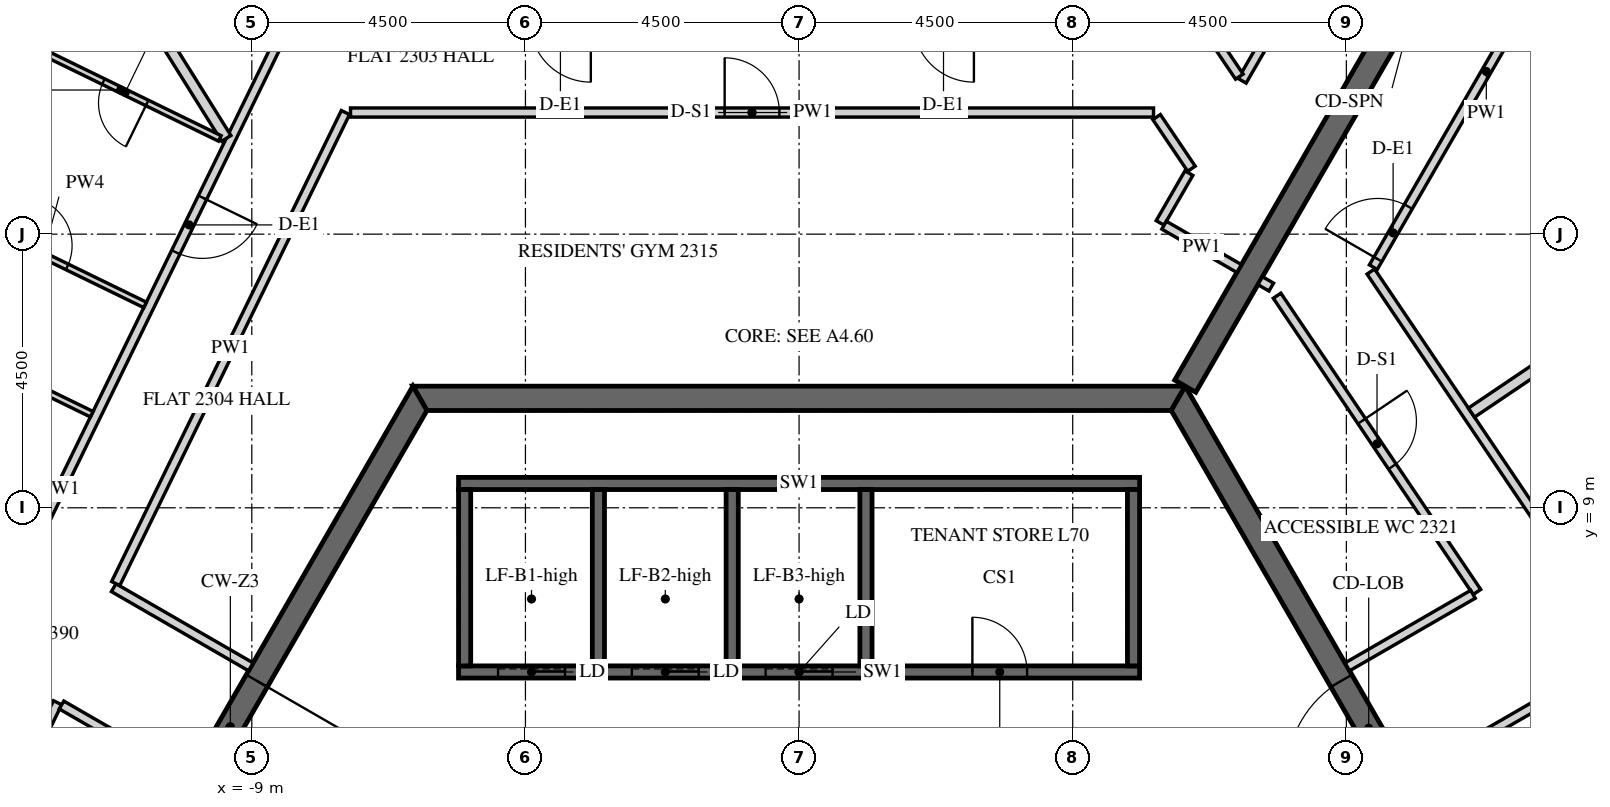
"""IFC4 building model, lengths in metres.
Left out: names, types, materials, properties, quantities, classifications, styles, units other than length and angle.
Written with IfcOpenShell. Run it as: python <this file> out.ifc"""

import sys

from ifc_helpers import new_model, si_unit, direction, frame, frame_2d, origin, place, context, subcontext, project, spatial, polyline, rectangle, outline, extrude, element, fill, save


model = new_model("IFC4")
c1 = context("Model", 3, precision=1e-05, world=origin(), true_north=direction((0.0, 1.0)))
c2 = subcontext(c1, "Body", "Model", "MODEL_VIEW")
j1 = project(units=[si_unit("LENGTHUNIT", "METRE"), si_unit("PLANEANGLEUNIT", "RADIAN")], contexts=[c1])
p1 = place(None, origin())
s1 = spatial("IfcSite", under=j1, at=p1, CompositionType="ELEMENT")
p2 = place(p1, origin())
s2 = spatial("IfcBuilding", under=s1, at=p2, CompositionType="ELEMENT")
p3 = place(p2, frame((0.0, 0.0, 291.3)))
s3 = spatial("IfcBuildingStorey", under=s2, at=p3, CompositionType="ELEMENT", Elevation=291.3)
p4 = place(p3, frame((-6.235, 10.8, -0.15), z_axis=(0.0, 0.0, 1.0), x_axis=(-0.499996419489, -0.866027470984, 0.0)))
e1 = element("IfcWall", 1, at=p4, inside=s3, PredefinedType="SHEAR", context=c2, shape_type="SweptSolid", body=[
    extrude(outline(polyline([(-0.115, -0.2), (12.586, -0.2), (12.355, 0.2), (0.115, 0.2), (-0.115, -0.2)])), origin(), (0.0, 0.0, 1.0), 3.9),
])
p5 = place(p4, frame((5.364, 0.0, 0.15)))
e2 = element("IfcOpeningElement", 2, at=p5, cuts=e1, PredefinedType="OPENING", context=c2, shape_type="SweptSolid", body=[
    extrude(rectangle(XDim=1.8, YDim=2.4, at=frame_2d((0.9, 1.2))), frame((0.0, 0.21, 0.0), z_axis=(0.0, -1.0, 0.0), x_axis=(1.0, 0.0, 0.0)), (0.0, 0.0, 1.0), 0.42),
])
p6 = place(p3, frame((12.471, 0.0, -0.15), z_axis=(0.0, 0.0, 1.0), x_axis=(-0.499996419489, 0.866027470984, 0.0)))
e3 = element("IfcWall", 3, at=p6, inside=s3, PredefinedType="SHEAR", context=c2, shape_type="SweptSolid", body=[
    extrude(outline(polyline([(-0.115, -0.2), (12.586, -0.2), (12.355, 0.2), (0.115, 0.2), (-0.115, -0.2)])), origin(), (0.0, 0.0, 1.0), 3.9),
])
p7 = place(p6, frame((5.306, 0.0, 0.15)))
e4 = element("IfcOpeningElement", 4, at=p7, cuts=e3, PredefinedType="OPENING", context=c2, shape_type="SweptSolid", body=[
    extrude(rectangle(XDim=1.8, YDim=2.4, at=frame_2d((0.9, 1.2))), frame((0.0, 0.21, 0.0), z_axis=(0.0, -1.0, 0.0), x_axis=(1.0, 0.0, 0.0)), (0.0, 0.0, 1.0), 0.42),
])
p8 = place(p3, frame((6.235, 10.8, -0.15), z_axis=(0.0, 0.0, 1.0), x_axis=(-1.0, 0.0, 0.0)))
e5 = element("IfcWall", 5, at=p8, inside=s3, PredefinedType="SHEAR", context=c2, shape_type="SweptSolid", body=[
    extrude(outline(polyline([(-0.115, -0.2), (12.586, -0.2), (12.355, 0.2), (0.115, 0.2), (-0.115, -0.2)])), origin(), (0.0, 0.0, 1.0), 3.9),
])
p9 = place(p3, frame((6.351, 11.0, -0.15), z_axis=(0.0, 0.0, 1.0), x_axis=(0.499998894578, 0.866026041999, 0.0)))
e6 = element("IfcWall", 6, at=p9, inside=s3, PredefinedType="SHEAR", context=c2, shape_type="SweptSolid", body=[
    extrude(rectangle(XDim=15.544, YDim=0.4, at=frame_2d((7.772, 0.0))), origin(), (0.0, 0.0, 1.0), 3.9),
])
p10 = place(p9, frame((6.872, 0.0, 0.15)))
e7 = element("IfcOpeningElement", 7, at=p10, cuts=e6, PredefinedType="OPENING", context=c2, shape_type="SweptSolid", body=[
    extrude(rectangle(XDim=1.8, YDim=2.4, at=frame_2d((0.9, 1.2))), frame((0.0, 0.21, 0.0), z_axis=(0.0, -1.0, 0.0), x_axis=(1.0, 0.0, 0.0)), (0.0, 0.0, 1.0), 0.42),
])
p11 = place(p3, frame((-5.6, 6.3, -0.25), z_axis=(0.0, 0.0, 1.0), x_axis=(1.0, 0.0, 0.0)))
e8 = element("IfcWall", 8, at=p11, inside=s3, PredefinedType="SHEAR", context=c2, shape_type="SweptSolid", body=[
    extrude(rectangle(XDim=11.2, YDim=0.2, at=frame_2d((5.6, 0.0))), origin(), (0.0, 0.0, 1.0), 3.9),
])
p12 = place(p11, frame((8.45, 0.0, 0.25)))
e9 = element("IfcOpeningElement", 9, at=p12, cuts=e8, PredefinedType="OPENING", context=c2, shape_type="SweptSolid", body=[
    extrude(rectangle(XDim=0.9, YDim=2.1, at=frame_2d((0.45, 1.05))), frame((0.0, 0.11, 0.0), z_axis=(0.0, -1.0, 0.0), x_axis=(1.0, 0.0, 0.0)), (0.0, 0.0, 1.0), 0.22),
])
p13 = place(p11, frame((0.65, 0.0, 0.25)))
e10 = element("IfcOpeningElement", 10, at=p13, cuts=e8, PredefinedType="OPENING", context=c2, shape_type="SweptSolid", body=[
    extrude(rectangle(XDim=1.1, YDim=2.1, at=frame_2d((0.55, 1.05))), frame((0.0, 0.11, 0.0), z_axis=(0.0, -1.0, 0.0), x_axis=(1.0, 0.0, 0.0)), (0.0, 0.0, 1.0), 0.22),
])
p14 = place(p11, frame((2.85, 0.0, 0.25)))
e11 = element("IfcOpeningElement", 11, at=p14, cuts=e8, PredefinedType="OPENING", context=c2, shape_type="SweptSolid", body=[
    extrude(rectangle(XDim=1.1, YDim=2.1, at=frame_2d((0.55, 1.05))), frame((0.0, 0.11, 0.0), z_axis=(0.0, -1.0, 0.0), x_axis=(1.0, 0.0, 0.0)), (0.0, 0.0, 1.0), 0.22),
])
p15 = place(p11, frame((5.05, 0.0, 0.25)))
e12 = element("IfcOpeningElement", 12, at=p15, cuts=e8, PredefinedType="OPENING", context=c2, shape_type="SweptSolid", body=[
    extrude(rectangle(XDim=1.1, YDim=2.1, at=frame_2d((0.55, 1.05))), frame((0.0, 0.11, 0.0), z_axis=(0.0, -1.0, 0.0), x_axis=(1.0, 0.0, 0.0)), (0.0, 0.0, 1.0), 0.22),
])
p16 = place(p3, frame((-5.6, 9.4, -0.25), z_axis=(0.0, 0.0, 1.0), x_axis=(1.0, 0.0, 0.0)))
e13 = element("IfcWall", 13, at=p16, inside=s3, PredefinedType="SHEAR", context=c2, shape_type="SweptSolid", body=[
    extrude(rectangle(XDim=11.2, YDim=0.2, at=frame_2d((5.6, 0.0))), origin(), (0.0, 0.0, 1.0), 3.9),
])
for number, where, z_axis, x_axis in (
    (14, (-5.5, 6.4, -0.25), (0.0, 0.0, 1.0), (0.0, 1.0, 0.0)),
    (15, (-3.3, 6.4, -0.25), (0.0, 0.0, 1.0), (0.0, 1.0, 0.0)),
    (16, (-1.1, 6.4, -0.25), (0.0, 0.0, 1.0), (0.0, 1.0, 0.0)),
    (17, (1.1, 6.4, -0.25), (0.0, 0.0, 1.0), (0.0, 1.0, 0.0)),
    (18, (5.5, 6.4, -0.25), (0.0, 0.0, 1.0), (0.0, 1.0, 0.0)),
):
    element("IfcWall", number, at=place(p3, frame(where, z_axis=z_axis, x_axis=x_axis)), inside=s3, PredefinedType="SHEAR", context=c2, shape_type="SweptSolid", body=[
        extrude(rectangle(XDim=2.9, YDim=0.2, at=frame_2d((1.45, 0.0))), origin(), (0.0, 0.0, 1.0), 3.9),
    ])
p17 = place(p3, frame((10.177, 21.027, 0.0), z_axis=(0.0, 0.0, 1.0), x_axis=(-0.500013707032, -0.866017489881, 0.0)))
e19 = element("IfcWall", 19, at=p17, inside=s3, PredefinedType="PARTITIONING", context=c2, shape_type="SweptSolid", body=[
    extrude(rectangle(XDim=5.781, YDim=0.15, at=frame_2d((2.89, 0.0))), origin(), (0.0, 0.0, 1.0), 2.988),
])
p18 = place(p17, frame((2.353, 0.0, 0.0)))
e20 = element("IfcOpeningElement", 20, at=p18, cuts=e19, PredefinedType="OPENING", context=c2, shape_type="SweptSolid", body=[
    extrude(rectangle(XDim=1.0, YDim=2.1, at=frame_2d((0.5, 1.05))), frame((0.0, 0.085, 0.0), z_axis=(0.0, -1.0, 0.0), x_axis=(1.0, 0.0, 0.0)), (0.0, 0.0, 1.0), 0.17),
])
p19 = place(p3, frame((7.24, 16.09, 0.0), z_axis=(0.0, 0.0, 1.0), x_axis=(-0.559159452146, 0.829060134777, 0.0)))
e21 = element("IfcWall", 21, at=p19, inside=s3, PredefinedType="PARTITIONING", context=c2, shape_type="SweptSolid", body=[
    extrude(rectangle(XDim=1.097, YDim=0.15, at=frame_2d((0.549, 0.0))), origin(), (0.0, 0.0, 1.0), 2.988),
])
p20 = place(p3, frame((-8.434, 16.925, 0.0), z_axis=(0.0, 0.0, 1.0), x_axis=(-0.438371383278, -0.898793930956, 0.0)))
e22 = element("IfcWall", 22, at=p20, inside=s3, PredefinedType="PARTITIONING", context=c2, shape_type="SweptSolid", body=[
    extrude(rectangle(XDim=16.939, YDim=0.15, at=frame_2d((8.47, 0.0))), origin(), (0.0, 0.0, 1.0), 2.988),
])
p21 = place(p20, frame((3.142, 0.0, 0.0)))
e23 = element("IfcOpeningElement", 23, at=p21, cuts=e22, PredefinedType="OPENING", context=c2, shape_type="SweptSolid", body=[
    extrude(rectangle(XDim=1.0, YDim=2.1, at=frame_2d((0.5, 1.05))), frame((0.0, 0.085, 0.0), z_axis=(0.0, -1.0, 0.0), x_axis=(1.0, 0.0, 0.0)), (0.0, 0.0, 1.0), 0.17),
])
p22 = place(p20, frame((15.39, 0.0, 0.0)))
e24 = element("IfcOpeningElement", 24, at=p22, cuts=e22, PredefinedType="OPENING", context=c2, shape_type="SweptSolid", body=[
    extrude(rectangle(XDim=1.0, YDim=2.1, at=frame_2d((0.5, 1.05))), frame((0.0, 0.085, 0.0), z_axis=(0.0, -1.0, 0.0), x_axis=(1.0, 0.0, 0.0)), (0.0, 0.0, 1.0), 0.17),
])
p23 = place(p3, frame((-9.016, 6.384, 0.0), z_axis=(0.0, 0.0, 1.0), x_axis=(-0.866031051173, 0.499990218309, 0.0)))
e25 = element("IfcWall", 25, at=p23, inside=s3, PredefinedType="PARTITIONING", context=c2, shape_type="SweptSolid", body=[
    extrude(rectangle(XDim=2.604, YDim=0.15, at=frame_2d((1.302, 0.0))), origin(), (0.0, 0.0, 1.0), 2.988),
])
p24 = place(p3, frame((-11.238, 7.754, 0.0), z_axis=(0.0, 0.0, 1.0), x_axis=(0.438387352899, 0.89878614187, 0.0)))
e26 = element("IfcWall", 26, at=p24, inside=s3, PredefinedType="PARTITIONING", context=c2, shape_type="SweptSolid", body=[
    extrude(rectangle(XDim=8.618, YDim=0.15, at=frame_2d((4.309, 0.0))), origin(), (0.0, 0.0, 1.0), 2.988),
])
p25 = place(p3, frame((-7.377, 15.5, 0.0), z_axis=(0.0, 0.0, 1.0), x_axis=(1.0, 0.0, 0.0)))
e27 = element("IfcWall", 27, at=p25, inside=s3, PredefinedType="PARTITIONING", context=c2, shape_type="SweptSolid", body=[
    extrude(rectangle(XDim=13.206, YDim=0.15, at=frame_2d((6.603, 0.0))), origin(), (0.0, 0.0, 1.0), 2.988),
])
p26 = place(p25, frame((6.153, 0.0, 0.0)))
e28 = element("IfcOpeningElement", 28, at=p26, cuts=e27, PredefinedType="OPENING", context=c2, shape_type="SweptSolid", body=[
    extrude(rectangle(XDim=0.9, YDim=2.1, at=frame_2d((0.45, 1.05))), frame((0.0, 0.085, 0.0), z_axis=(0.0, -1.0, 0.0), x_axis=(1.0, 0.0, 0.0)), (0.0, 0.0, 1.0), 0.17),
])
p27 = place(p3, frame((5.88, 15.425, 0.0), z_axis=(0.0, 0.0, 1.0), x_axis=(0.559202631314, -0.829031010959, 0.0)))
e29 = element("IfcWall", 29, at=p27, inside=s3, PredefinedType="PARTITIONING", context=c2, shape_type="SweptSolid", body=[
    extrude(rectangle(XDim=1.024, YDim=0.15, at=frame_2d((0.512, 0.0))), origin(), (0.0, 0.0, 1.0), 2.988),
])
p28 = place(p3, frame((6.411, 14.504, 0.0), z_axis=(0.0, 0.0, 1.0), x_axis=(-0.499998034377, -0.866026538634, 0.0)))
e30 = element("IfcWall", 30, at=p28, inside=s3, PredefinedType="PARTITIONING", context=c2, shape_type="SweptSolid", body=[
    extrude(rectangle(XDim=0.946, YDim=0.15, at=frame_2d((0.473, 0.0))), origin(), (0.0, 0.0, 1.0), 2.988),
])
p29 = place(p3, frame((6.003, 13.647, 0.0), z_axis=(0.0, 0.0, 1.0), x_axis=(0.865988727248, -0.500063520245, 0.0)))
e31 = element("IfcWall", 31, at=p29, inside=s3, PredefinedType="PARTITIONING", context=c2, shape_type="SweptSolid", body=[
    extrude(rectangle(XDim=1.425, YDim=0.15, at=frame_2d((0.712, 0.0))), origin(), (0.0, 0.0, 1.0), 2.988),
])
p30 = place(p3, frame((-14.745, 0.564, 0.0), z_axis=(0.0, 0.0, 1.0), x_axis=(0.438348416625, 0.898805132185, 0.0)))
e32 = element("IfcWall", 32, at=p30, inside=s3, PredefinedType="PARTITIONING", context=c2, shape_type="SweptSolid", body=[
    extrude(rectangle(XDim=5.82, YDim=0.15, at=frame_2d((2.91, 0.0))), origin(), (0.0, 0.0, 1.0), 2.988),
])
p31 = place(p30, frame((2.46, 0.0, 0.0)))
e33 = element("IfcOpeningElement", 33, at=p31, cuts=e32, PredefinedType="OPENING", context=c2, shape_type="SweptSolid", body=[
    extrude(rectangle(XDim=0.9, YDim=2.1, at=frame_2d((0.45, 1.05))), frame((0.0, 0.085, 0.0), z_axis=(0.0, -1.0, 0.0), x_axis=(1.0, 0.0, 0.0)), (0.0, 0.0, 1.0), 0.17),
])
p32 = place(p3, frame((-12.129, 5.757, 0.0), z_axis=(0.0, 0.0, 1.0), x_axis=(0.866033707122, -0.499985617921, 0.0)))
e34 = element("IfcWall", 34, at=p32, inside=s3, PredefinedType="PARTITIONING", context=c2, shape_type="SweptSolid", body=[
    extrude(rectangle(XDim=2.382, YDim=0.15, at=frame_2d((1.191, 0.0))), origin(), (0.0, 0.0, 1.0), 2.988),
])
p33 = place(p3, frame((18.875, -1.158, 0.0), z_axis=(0.0, 0.0, 1.0), x_axis=(-0.55919880344, 0.829033592945, 0.0)))
e35 = element("IfcWall", 35, at=p33, inside=s3, PredefinedType="PARTITIONING", context=c2, shape_type="SweptSolid", body=[
    extrude(rectangle(XDim=16.939, YDim=0.15, at=frame_2d((8.47, 0.0))), origin(), (0.0, 0.0, 1.0), 2.988),
])
p34 = place(p33, frame((6.09, 0.0, 0.0)))
e36 = element("IfcOpeningElement", 36, at=p34, cuts=e35, PredefinedType="OPENING", context=c2, shape_type="SweptSolid", body=[
    extrude(rectangle(XDim=1.0, YDim=2.1, at=frame_2d((0.5, 1.05))), frame((0.0, 0.085, 0.0), z_axis=(0.0, -1.0, 0.0), x_axis=(1.0, 0.0, 0.0)), (0.0, 0.0, 1.0), 0.17),
])
p35 = place(p3, frame((9.444, 12.957, 0.0), z_axis=(0.0, 0.0, 1.0), x_axis=(0.500004967958, 0.866022535513, 0.0)))
e37 = element("IfcWall", 37, at=p35, inside=s3, PredefinedType="PARTITIONING", context=c2, shape_type="SweptSolid", body=[
    extrude(rectangle(XDim=7.431, YDim=0.15, at=frame_2d((3.715, 0.0))), origin(), (0.0, 0.0, 1.0), 2.988),
])
p36 = place(p35, frame((0.15, 0.0, 0.0)))
e38 = element("IfcOpeningElement", 38, at=p36, cuts=e37, PredefinedType="OPENING", context=c2, shape_type="SweptSolid", body=[
    extrude(rectangle(XDim=1.0, YDim=2.1, at=frame_2d((0.5, 1.05))), frame((0.0, 0.085, 0.0), z_axis=(0.0, -1.0, 0.0), x_axis=(1.0, 0.0, 0.0)), (0.0, 0.0, 1.0), 0.17),
])
p37 = place(p3, frame((10.066, 4.566, 0.0), z_axis=(0.0, 0.0, 1.0), x_axis=(0.866034402474, 0.499984413489, 0.0)))
e39 = element("IfcWall", 39, at=p37, inside=s3, PredefinedType="PARTITIONING", context=c2, shape_type="SweptSolid", body=[
    extrude(rectangle(XDim=2.608, YDim=0.15, at=frame_2d((1.304, 0.0))), origin(), (0.0, 0.0, 1.0), 2.988),
])
p38 = place(p3, frame((7.583, 12.735, 0.0), z_axis=(0.0, 0.0, 1.0), x_axis=(0.866088799389, -0.499890179513, 0.0)))
e40 = element("IfcWall", 40, at=p38, inside=s3, PredefinedType="PARTITIONING", context=c2, shape_type="SweptSolid", body=[
    extrude(rectangle(XDim=0.21, YDim=0.15, at=frame_2d((0.105, 0.0))), origin(), (0.0, 0.0, 1.0), 2.988),
])
p39 = place(p3, frame((7.861, 12.488, 0.0), z_axis=(0.0, 0.0, 1.0), x_axis=(0.559178186788, -0.829047498893, 0.0)))
e41 = element("IfcWall", 41, at=p39, inside=s3, PredefinedType="PARTITIONING", context=c2, shape_type="SweptSolid", body=[
    extrude(rectangle(XDim=5.878, YDim=0.15, at=frame_2d((2.939, 0.0))), origin(), (0.0, 0.0, 1.0), 2.988),
])
p40 = place(p39, frame((2.489, 0.0, 0.0)))
e42 = element("IfcOpeningElement", 42, at=p40, cuts=e41, PredefinedType="OPENING", context=c2, shape_type="SweptSolid", body=[
    extrude(rectangle(XDim=0.9, YDim=2.1, at=frame_2d((0.45, 1.05))), frame((0.0, 0.085, 0.0), z_axis=(0.0, -1.0, 0.0), x_axis=(1.0, 0.0, 0.0)), (0.0, 0.0, 1.0), 0.17),
])
p41 = place(p3, frame((11.082, 7.578, 0.0), z_axis=(0.0, 0.0, 1.0), x_axis=(-0.865993065409, -0.500056007527, 0.0)))
e43 = element("IfcWall", 43, at=p41, inside=s3, PredefinedType="PARTITIONING", context=c2, shape_type="SweptSolid", body=[
    extrude(rectangle(XDim=2.386, YDim=0.15, at=frame_2d((1.193, 0.0))), origin(), (0.0, 0.0, 1.0), 2.988),
])
p42 = place(p3, frame((-11.283, 18.057, 0.0), z_axis=(0.0, 0.0, 1.0), x_axis=(0.529892826056, -0.84806461599, 0.0)))
e44 = element("IfcWall", 44, at=p42, inside=s3, PredefinedType="PARTITIONING", context=c2, shape_type="SweptSolid", body=[
    extrude(rectangle(XDim=3.516, YDim=0.18, at=frame_2d((1.758, 0.0))), origin(), (0.0, 0.0, 1.0), 2.988),
])
p43 = place(p3, frame((-11.632, 10.539, 0.0), z_axis=(0.0, 0.0, 1.0), x_axis=(-0.898775374511, 0.438409427558, 0.0)))
e45 = element("IfcWall", 45, at=p43, inside=s3, PredefinedType="PARTITIONING", context=c2, shape_type="SweptSolid", body=[
    extrude(rectangle(XDim=3.725, YDim=0.1, at=frame_2d((1.862, 0.0))), origin(), (0.0, 0.0, 1.0), 2.988),
])
p44 = place(p3, frame((-14.104, 13.969, 0.0), z_axis=(0.0, 0.0, 1.0), x_axis=(0.898775374511, -0.438409427558, 0.0)))
e46 = element("IfcWall", 46, at=p44, inside=s3, PredefinedType="PARTITIONING", context=c2, shape_type="SweptSolid", body=[
    extrude(rectangle(XDim=3.725, YDim=0.1, at=frame_2d((1.862, 0.0))), origin(), (0.0, 0.0, 1.0), 2.988),
])
p45 = place(p44, frame((1.5, 0.0, 0.0)))
e47 = element("IfcOpeningElement", 47, at=p45, cuts=e46, PredefinedType="OPENING", context=c2, shape_type="SweptSolid", body=[
    extrude(rectangle(XDim=0.8, YDim=2.1, at=frame_2d((0.4, 1.05))), frame((0.0, 0.06, 0.0), z_axis=(0.0, -1.0, 0.0), x_axis=(1.0, 0.0, 0.0)), (0.0, 0.0, 1.0), 0.12),
])
p46 = place(p3, frame((-9.526, 15.074, 0.0), z_axis=(0.0, 0.0, 1.0), x_axis=(-0.898808514517, 0.438341481304, 0.0)))
e48 = element("IfcWall", 48, at=p46, inside=s3, PredefinedType="PARTITIONING", context=c2, shape_type="SweptSolid", body=[
    extrude(rectangle(XDim=3.63, YDim=0.1, at=frame_2d((1.815, 0.0))), origin(), (0.0, 0.0, 1.0), 2.988),
])
p47 = place(p46, frame((1.33, 0.0, 0.0)))
e49 = element("IfcOpeningElement", 49, at=p47, cuts=e48, PredefinedType="OPENING", context=c2, shape_type="SweptSolid", body=[
    extrude(rectangle(XDim=0.8, YDim=2.1, at=frame_2d((0.4, 1.05))), frame((0.0, 0.06, 0.0), z_axis=(0.0, -1.0, 0.0), x_axis=(1.0, 0.0, 0.0)), (0.0, 0.0, 1.0), 0.12),
])
p48 = place(p3, frame((18.042, 15.276, 0.0), z_axis=(0.0, 0.0, 1.0), x_axis=(-0.829037762759, -0.559192621481, 0.0)))
e50 = element("IfcWall", 50, at=p48, inside=s3, PredefinedType="PARTITIONING", context=c2, shape_type="SweptSolid", body=[
    extrude(rectangle(XDim=8.425, YDim=0.18, at=frame_2d((4.212, 0.0))), origin(), (0.0, 0.0, 1.0), 2.988),
])
p49 = place(p5, origin())
e51 = element("IfcDoor", 51, at=p49, inside=s3, OperationType="DOUBLE_DOOR_SINGLE_SWING", PredefinedType="DOOR", context=c2, shape_type="SweptSolid", body=[
    extrude(rectangle(XDim=1.8, YDim=2.4, at=frame_2d((0.9, 1.2))), frame((0.0, 0.025, 0.0), z_axis=(0.0, -1.0, 0.0), x_axis=(1.0, 0.0, 0.0)), (0.0, 0.0, 1.0), 0.05),
])
fill(e2, e51)
p50 = place(p7, origin())
e52 = element("IfcDoor", 52, at=p50, inside=s3, OperationType="DOUBLE_DOOR_SINGLE_SWING", PredefinedType="DOOR", context=c2, shape_type="SweptSolid", body=[
    extrude(rectangle(XDim=1.8, YDim=2.4, at=frame_2d((0.9, 1.2))), frame((0.0, 0.025, 0.0), z_axis=(0.0, -1.0, 0.0), x_axis=(1.0, 0.0, 0.0)), (0.0, 0.0, 1.0), 0.05),
])
fill(e4, e52)
p51 = place(p12, origin())
e53 = element("IfcDoor", 53, at=p51, inside=s3, OperationType="SINGLE_SWING_LEFT", PredefinedType="DOOR", context=c2, shape_type="SweptSolid", body=[
    extrude(rectangle(XDim=0.9, YDim=2.1, at=frame_2d((0.45, 1.05))), frame((0.0, 0.025, 0.0), z_axis=(0.0, -1.0, 0.0), x_axis=(1.0, 0.0, 0.0)), (0.0, 0.0, 1.0), 0.05),
])
fill(e9, e53)
p52 = place(p13, origin())
e54 = element("IfcDoor", 54, at=p52, inside=s3, OperationType="SLIDING_TO_LEFT", PredefinedType="DOOR", context=c2, shape_type="SweptSolid", body=[
    extrude(rectangle(XDim=1.1, YDim=2.1, at=frame_2d((0.55, 1.05))), frame((0.0, 0.025, 0.0), z_axis=(0.0, -1.0, 0.0), x_axis=(1.0, 0.0, 0.0)), (0.0, 0.0, 1.0), 0.05),
])
fill(e10, e54)
p53 = place(p14, origin())
e55 = element("IfcDoor", 55, at=p53, inside=s3, OperationType="SLIDING_TO_LEFT", PredefinedType="DOOR", context=c2, shape_type="SweptSolid", body=[
    extrude(rectangle(XDim=1.1, YDim=2.1, at=frame_2d((0.55, 1.05))), frame((0.0, 0.025, 0.0), z_axis=(0.0, -1.0, 0.0), x_axis=(1.0, 0.0, 0.0)), (0.0, 0.0, 1.0), 0.05),
])
fill(e11, e55)
p54 = place(p15, origin())
e56 = element("IfcDoor", 56, at=p54, inside=s3, OperationType="SLIDING_TO_LEFT", PredefinedType="DOOR", context=c2, shape_type="SweptSolid", body=[
    extrude(rectangle(XDim=1.1, YDim=2.1, at=frame_2d((0.55, 1.05))), frame((0.0, 0.025, 0.0), z_axis=(0.0, -1.0, 0.0), x_axis=(1.0, 0.0, 0.0)), (0.0, 0.0, 1.0), 0.05),
])
fill(e12, e56)
p55 = place(p21, origin())
e57 = element("IfcDoor", 57, at=p55, inside=s3, OperationType="SINGLE_SWING_LEFT", PredefinedType="DOOR", context=c2, shape_type="SweptSolid", body=[
    extrude(rectangle(XDim=1.0, YDim=2.1, at=frame_2d((0.5, 1.05))), frame((0.0, 0.025, 0.0), z_axis=(0.0, -1.0, 0.0), x_axis=(1.0, 0.0, 0.0)), (0.0, 0.0, 1.0), 0.05),
])
fill(e23, e57)
p56 = place(p45, origin())
e58 = element("IfcDoor", 58, at=p56, inside=s3, OperationType="SINGLE_SWING_LEFT", PredefinedType="DOOR", context=c2, shape_type="SweptSolid", body=[
    extrude(rectangle(XDim=0.8, YDim=2.1, at=frame_2d((0.4, 1.05))), frame((0.0, 0.025, 0.0), z_axis=(0.0, -1.0, 0.0), x_axis=(1.0, 0.0, 0.0)), (0.0, 0.0, 1.0), 0.05),
])
fill(e47, e58)
p57 = place(p47, origin())
e59 = element("IfcDoor", 59, at=p57, inside=s3, OperationType="SINGLE_SWING_RIGHT", PredefinedType="DOOR", context=c2, shape_type="SweptSolid", body=[
    extrude(rectangle(XDim=0.8, YDim=2.1, at=frame_2d((0.4, 1.05))), frame((0.0, 0.025, 0.0), z_axis=(0.0, -1.0, 0.0), x_axis=(1.0, 0.0, 0.0)), (0.0, 0.0, 1.0), 0.05),
])
fill(e49, e59)
p58 = place(p36, origin())
e60 = element("IfcDoor", 60, at=p58, inside=s3, OperationType="SINGLE_SWING_RIGHT", PredefinedType="DOOR", context=c2, shape_type="SweptSolid", body=[
    extrude(rectangle(XDim=1.0, YDim=2.1, at=frame_2d((0.5, 1.05))), frame((0.0, 0.025, 0.0), z_axis=(0.0, -1.0, 0.0), x_axis=(1.0, 0.0, 0.0)), (0.0, 0.0, 1.0), 0.05),
])
fill(e38, e60)
p59 = place(p26, origin())
e61 = element("IfcDoor", 61, at=p59, inside=s3, OperationType="SINGLE_SWING_LEFT", PredefinedType="DOOR", context=c2, shape_type="SweptSolid", body=[
    extrude(rectangle(XDim=0.9, YDim=2.1, at=frame_2d((0.45, 1.05))), frame((0.0, 0.025, 0.0), z_axis=(0.0, -1.0, 0.0), x_axis=(1.0, 0.0, 0.0)), (0.0, 0.0, 1.0), 0.05),
])
fill(e28, e61)
p60 = place(p40, origin())
e62 = element("IfcDoor", 62, at=p60, inside=s3, OperationType="SINGLE_SWING_RIGHT", PredefinedType="DOOR", context=c2, shape_type="SweptSolid", body=[
    extrude(rectangle(XDim=0.9, YDim=2.1, at=frame_2d((0.45, 1.05))), frame((0.0, 0.025, 0.0), z_axis=(0.0, -1.0, 0.0), x_axis=(1.0, 0.0, 0.0)), (0.0, 0.0, 1.0), 0.05),
])
fill(e42, e62)
save(model, sys.argv[1])
